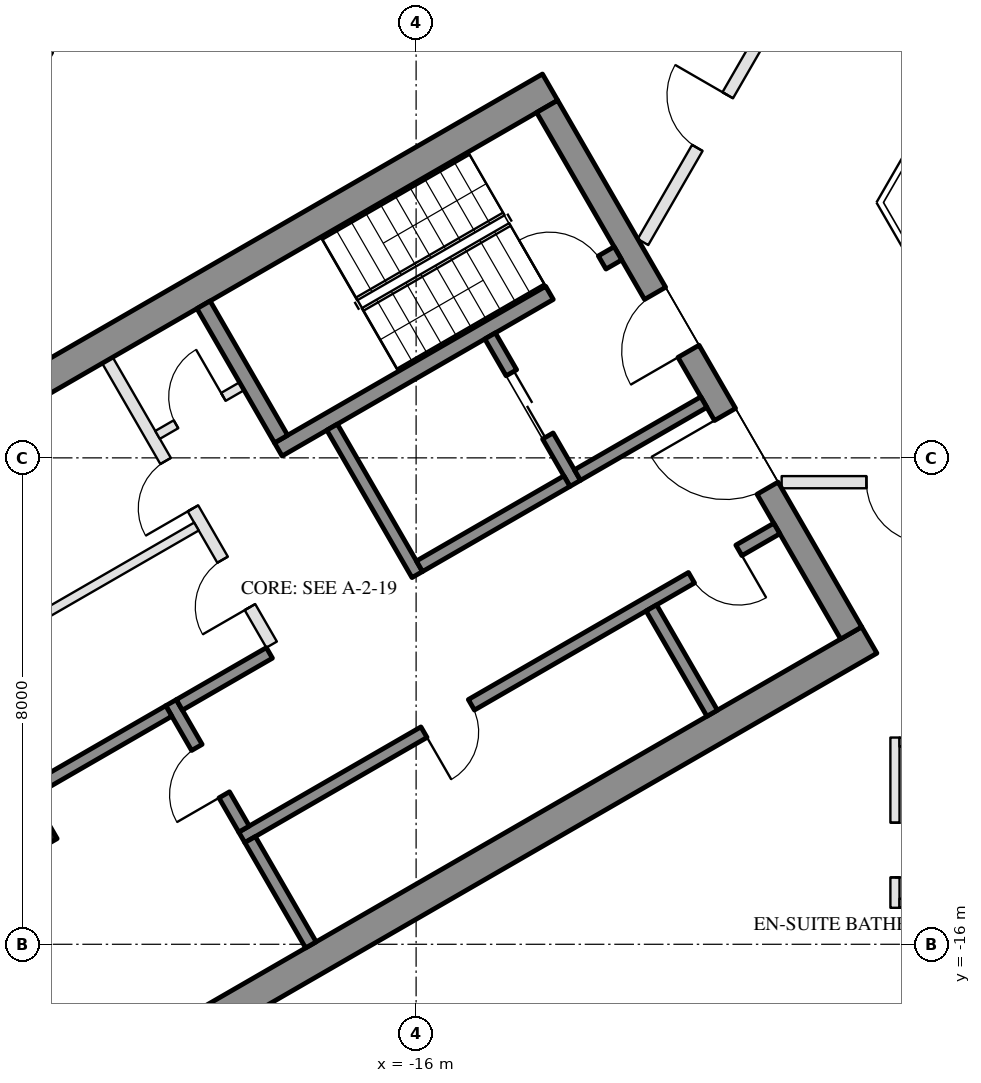
"""IFC4 building model, lengths in metres.
Left out: names, types, materials, properties, quantities, classifications, styles, units other than length and angle.
Written with IfcOpenShell. Run it as: python <this file> out.ifc"""

import sys

from ifc_helpers import new_model, si_unit, direction, frame, frame_2d, origin, origin_2d, place, context, subcontext, project, spatial, rectangle, hollow_rectangle, extrude, element, fill, save


model = new_model("IFC4")
c1 = context("Model", 3, precision=1e-05, world=origin(), true_north=direction((0.0, 1.0)))
c2 = subcontext(c1, "Body", "Model", "MODEL_VIEW")
j1 = project(units=[si_unit("LENGTHUNIT", "METRE"), si_unit("PLANEANGLEUNIT", "RADIAN")], contexts=[c1])
p1 = place(None, origin())
s1 = spatial("IfcSite", under=j1, at=p1, CompositionType="ELEMENT")
p2 = place(p1, origin())
s2 = spatial("IfcBuilding", under=s1, at=p2, CompositionType="ELEMENT")
p3 = place(p2, frame((0.0, 0.0, 90.9)))
s3 = spatial("IfcBuildingStorey", under=s2, at=p3, CompositionType="ELEMENT", Elevation=90.9)
p4 = place(p3, frame((-23.643, -13.65, 0.0), z_axis=(0.0, 0.0, 1.0), x_axis=(-0.5, 0.866025403784, 0.0)))
e1 = element("IfcColumn", 1, at=p4, inside=s3, PredefinedType="COLUMN", context=c2, shape_type="SweptSolid", body=[
    extrude(hollow_rectangle(XDim=2.8, YDim=2.4, WallThickness=0.07, at=origin_2d()), origin(), (0.0, 0.0, 1.0), 3.7),
])
p5 = place(p3, frame((-20.309, 1.934, 0.0), z_axis=(0.0, 0.0, 1.0), x_axis=(-0.499992114976, -0.866029956157, 0.0)))
e2 = element("IfcWall", 2, at=p5, inside=s3, PredefinedType="SOLIDWALL", context=c2, shape_type="SweptSolid", body=[
    extrude(rectangle(XDim=6.74, YDim=0.35, at=frame_2d((3.37, 0.0))), origin(), (0.0, 0.0, 1.0), 3.55),
])
p6 = place(p5, frame((4.02, 0.0, 0.0)))
e3 = element("IfcOpeningElement", 3, at=p6, cuts=e2, PredefinedType="OPENING", context=c2, shape_type="SweptSolid", body=[
    extrude(rectangle(XDim=2.4, YDim=2.4, at=frame_2d((1.2, 1.2))), frame((0.0, 0.185, 0.0), z_axis=(0.0, -1.0, 0.0), x_axis=(1.0, 0.0, 0.0)), (0.0, 0.0, 1.0), 0.37),
])
p7 = place(p5, frame((0.77, 0.0, 0.3)))
e4 = element("IfcOpeningElement", 4, at=p7, cuts=e2, PredefinedType="OPENING", context=c2, shape_type="SweptSolid", body=[
    extrude(rectangle(XDim=2.9, YDim=2.65, at=frame_2d((1.45, 1.325))), frame((0.0, 0.185, 0.0), z_axis=(0.0, -1.0, 0.0), x_axis=(1.0, 0.0, 0.0)), (0.0, 0.0, 1.0), 0.37),
])
for number, where, z_axis, x_axis in (
    (5, (-13.797, -1.903, 0.0), (0.0, 0.0, 1.0), (-0.866, -0.5, 0.0)),
    (6, (-8.547, -10.997, 0.0), (0.0, 0.0, 1.0), (-0.866, -0.5, 0.0)),
):
    element("IfcWall", number, at=place(p3, frame(where, z_axis=z_axis, x_axis=x_axis)), inside=s3, PredefinedType="SHEAR", context=c2, shape_type="SweptSolid", body=[
        extrude(rectangle(XDim=14.837, YDim=0.5, at=frame_2d((7.418, 0.0))), origin(), (0.0, 0.0, 1.0), 3.5),
    ])
p8 = place(p3, frame((-13.845, -2.22, 0.0), z_axis=(0.0, 0.0, 1.0), x_axis=(0.500004234368, -0.866022959057, 0.0)))
e7 = element("IfcWall", 7, at=p8, inside=s3, PredefinedType="SHEAR", context=c2, shape_type="SweptSolid", body=[
    extrude(rectangle(XDim=10.0, YDim=0.4, at=frame_2d((5.0, 0.0))), origin(), (0.0, 0.0, 1.0), 3.5),
])
p9 = place(p8, frame((3.55, 0.0, 0.0)))
e8 = element("IfcOpeningElement", 8, at=p9, cuts=e7, PredefinedType="OPENING", context=c2, shape_type="SweptSolid", body=[
    extrude(rectangle(XDim=1.1, YDim=2.1, at=frame_2d((0.55, 1.05))), frame((0.0, 0.21, 0.0), z_axis=(0.0, -1.0, 0.0), x_axis=(1.0, 0.0, 0.0)), (0.0, 0.0, 1.0), 0.42),
])
p10 = place(p8, frame((5.85, 0.0, 0.0)))
e9 = element("IfcOpeningElement", 9, at=p10, cuts=e7, PredefinedType="OPENING", context=c2, shape_type="SweptSolid", body=[
    extrude(rectangle(XDim=1.4, YDim=2.1, at=frame_2d((0.7, 1.05))), frame((0.0, 0.21, 0.0), z_axis=(0.0, -1.0, 0.0), x_axis=(1.0, 0.0, 0.0)), (0.0, 0.0, 1.0), 0.42),
])
p11 = place(p3, frame((-12.681, -4.636, 0.0), z_axis=(0.0, 0.0, 1.0), x_axis=(-0.866021702275, -0.500006411147, 0.0)))
e10 = element("IfcWall", 10, at=p11, inside=s3, PredefinedType="SHEAR", context=c2, shape_type="SweptSolid", body=[
    extrude(rectangle(XDim=6.45, YDim=0.25, at=frame_2d((3.225, 0.0))), origin(), (0.0, 0.0, 1.0), 3.5),
])
p12 = place(p11, frame((0.3, 0.0, 0.0)))
e11 = element("IfcOpeningElement", 11, at=p12, cuts=e10, PredefinedType="OPENING", context=c2, shape_type="SweptSolid", body=[
    extrude(rectangle(XDim=1.0, YDim=2.1, at=frame_2d((0.5, 1.05))), frame((0.0, 0.135, 0.0), z_axis=(0.0, -1.0, 0.0), x_axis=(1.0, 0.0, 0.0)), (0.0, 0.0, 1.0), 0.27),
])
p13 = place(p3, frame((-19.496, -5.482, 0.0), z_axis=(0.0, 0.0, 1.0), x_axis=(0.499990435942, -0.866030925526, 0.0)))
e12 = element("IfcWall", 12, at=p13, inside=s3, PredefinedType="SHEAR", context=c2, shape_type="SweptSolid", body=[
    extrude(rectangle(XDim=2.55, YDim=0.25, at=frame_2d((1.275, 0.0))), origin(), (0.0, 0.0, 1.0), 3.5),
])
p14 = place(p3, frame((-17.381, -7.495, 0.0), z_axis=(0.0, 0.0, 1.0), x_axis=(0.500011755427, -0.866018616679, 0.0)))
e13 = element("IfcWall", 13, at=p14, inside=s3, PredefinedType="SHEAR", context=c2, shape_type="SweptSolid", body=[
    extrude(rectangle(XDim=2.8, YDim=0.2, at=frame_2d((1.4, 0.0))), origin(), (0.0, 0.0, 1.0), 3.5),
])
p15 = place(p3, frame((-14.783, -5.995, 0.0), z_axis=(0.0, 0.0, 1.0), x_axis=(0.49994636267, -0.866056369097, 0.0)))
e14 = element("IfcWall", 14, at=p15, inside=s3, PredefinedType="SHEAR", context=c2, shape_type="SweptSolid", body=[
    extrude(rectangle(XDim=2.8, YDim=0.2, at=frame_2d((1.4, 0.0))), origin(), (0.0, 0.0, 1.0), 3.5),
])
p16 = place(p15, frame((0.7, 0.0, 0.0)))
e15 = element("IfcOpeningElement", 15, at=p16, cuts=e14, PredefinedType="OPENING", context=c2, shape_type="SweptSolid", body=[
    extrude(rectangle(XDim=1.2, YDim=2.1, at=frame_2d((0.6, 1.05))), frame((0.0, 0.11, 0.0), z_axis=(0.0, -1.0, 0.0), x_axis=(1.0, 0.0, 0.0)), (0.0, 0.0, 1.0), 0.22),
])
p17 = place(p3, frame((-13.52, -8.383, 0.0), z_axis=(0.0, 0.0, 1.0), x_axis=(-0.866034573852, -0.49998411664, 0.0)))
e16 = element("IfcWall", 16, at=p17, inside=s3, PredefinedType="SHEAR", context=c2, shape_type="SweptSolid", body=[
    extrude(rectangle(XDim=2.8, YDim=0.2, at=frame_2d((1.4, 0.0))), origin(), (0.0, 0.0, 1.0), 3.5),
])
p18 = place(p3, frame((-11.268, -7.083, 0.0), z_axis=(0.0, 0.0, 1.0), x_axis=(-0.866050077142, -0.499957262057, 0.0)))
e17 = element("IfcWall", 17, at=p18, inside=s3, PredefinedType="SHEAR", context=c2, shape_type="SweptSolid", body=[
    extrude(rectangle(XDim=2.4, YDim=0.2, at=frame_2d((1.2, 0.0))), origin(), (0.0, 0.0, 1.0), 3.5),
])
p19 = place(p3, frame((-10.068, -9.162, 0.0), z_axis=(0.0, 0.0, 1.0), x_axis=(-0.866032725843, -0.499987317609, 0.0)))
e18 = element("IfcWall", 18, at=p19, inside=s3, PredefinedType="SHEAR", context=c2, shape_type="SweptSolid", body=[
    extrude(rectangle(XDim=10.16, YDim=0.2, at=frame_2d((5.08, 0.0))), origin(), (0.0, 0.0, 1.0), 3.5),
])
p20 = place(p19, frame((0.72, 0.0, 0.0)))
e19 = element("IfcOpeningElement", 19, at=p20, cuts=e18, PredefinedType="OPENING", context=c2, shape_type="SweptSolid", body=[
    extrude(rectangle(XDim=0.9, YDim=2.1, at=frame_2d((0.45, 1.05))), frame((0.0, 0.11, 0.0), z_axis=(0.0, -1.0, 0.0), x_axis=(1.0, 0.0, 0.0)), (0.0, 0.0, 1.0), 0.22),
])
p21 = place(p19, frame((5.8, 0.0, 0.0)))
e20 = element("IfcOpeningElement", 20, at=p21, cuts=e18, PredefinedType="OPENING", context=c2, shape_type="SweptSolid", body=[
    extrude(rectangle(XDim=0.9, YDim=2.1, at=frame_2d((0.45, 1.05))), frame((0.0, 0.11, 0.0), z_axis=(0.0, -1.0, 0.0), x_axis=(1.0, 0.0, 0.0)), (0.0, 0.0, 1.0), 0.22),
])
p22 = place(p3, frame((-20.031, -12.026, 0.0), z_axis=(0.0, 0.0, 1.0), x_axis=(0.500033551112, -0.866006032174, 0.0)))
e21 = element("IfcWall", 21, at=p22, inside=s3, PredefinedType="SHEAR", context=c2, shape_type="SweptSolid", body=[
    extrude(rectangle(XDim=2.4, YDim=0.2, at=frame_2d((1.2, 0.0))), origin(), (0.0, 0.0, 1.0), 3.5),
])
p23 = place(p22, frame((0.85, 0.0, 0.0)))
e22 = element("IfcOpeningElement", 22, at=p23, cuts=e21, PredefinedType="OPENING", context=c2, shape_type="SweptSolid", body=[
    extrude(rectangle(XDim=0.9, YDim=2.1, at=frame_2d((0.45, 1.05))), frame((0.0, 0.11, 0.0), z_axis=(0.0, -1.0, 0.0), x_axis=(1.0, 0.0, 0.0)), (0.0, 0.0, 1.0), 0.22),
])
p24 = place(p3, frame((-18.413, -11.208, 0.0), z_axis=(0.0, 0.0, 1.0), x_axis=(-0.866038183914, -0.499977863513, 0.0)))
e23 = element("IfcWall", 23, at=p24, inside=s3, PredefinedType="SHEAR", context=c2, shape_type="SweptSolid", body=[
    extrude(rectangle(XDim=1.71, YDim=0.2, at=frame_2d((0.855, 0.0))), origin(), (0.0, 0.0, 1.0), 3.5),
])
for number, where, z_axis, x_axis in (
    (24, (-12.131, -10.468, 0.0), (0.0, 0.0, 1.0), (0.5, -0.866, 0.0)),
    (25, (-18.73, -14.278, 0.0), (0.0, 0.0, 1.0), (0.5, -0.866, 0.0)),
):
    element("IfcWall", number, at=place(p3, frame(where, z_axis=z_axis, x_axis=x_axis)), inside=s3, PredefinedType="SHEAR", context=c2, shape_type="SweptSolid", body=[
        extrude(rectangle(XDim=2.0, YDim=0.2, at=frame_2d((1.0, 0.0))), origin(), (0.0, 0.0, 1.0), 3.5),
    ])
p25 = place(p3, frame((-20.067, -12.163, 0.0), z_axis=(0.0, 0.0, 1.0), x_axis=(-0.866060851709, -0.499938597367, 0.0)))
e26 = element("IfcWall", 26, at=p25, inside=s3, PredefinedType="SHEAR", context=c2, shape_type="SweptSolid", body=[
    extrude(rectangle(XDim=2.64, YDim=0.2, at=frame_2d((1.32, 0.0))), origin(), (0.0, 0.0, 1.0), 3.5),
])
p26 = place(p3, frame((-21.076, -6.395, 0.0), z_axis=(0.0, 0.0, 1.0), x_axis=(0.50001468107, -0.866016927499, 0.0)))
e27 = element("IfcWall", 27, at=p26, inside=s3, PredefinedType="PARTITIONING", context=c2, shape_type="SweptSolid", body=[
    extrude(rectangle(XDim=5.4, YDim=0.2, at=frame_2d((2.7, 0.0))), origin(), (0.0, 0.0, 1.0), 3.5),
])
p27 = place(p26, frame((1.913, 0.0, 0.0)))
e28 = element("IfcOpeningElement", 28, at=p27, cuts=e27, PredefinedType="OPENING", context=c2, shape_type="SweptSolid", body=[
    extrude(rectangle(XDim=0.9, YDim=2.1, at=frame_2d((0.45, 1.05))), frame((0.0, 0.11, 0.0), z_axis=(0.0, -1.0, 0.0), x_axis=(1.0, 0.0, 0.0)), (0.0, 0.0, 1.0), 0.22),
])
p28 = place(p26, frame((3.788, 0.0, 0.0)))
e29 = element("IfcOpeningElement", 29, at=p28, cuts=e27, PredefinedType="OPENING", context=c2, shape_type="SweptSolid", body=[
    extrude(rectangle(XDim=0.9, YDim=2.1, at=frame_2d((0.45, 1.05))), frame((0.0, 0.11, 0.0), z_axis=(0.0, -1.0, 0.0), x_axis=(1.0, 0.0, 0.0)), (0.0, 0.0, 1.0), 0.22),
])
p29 = place(p3, frame((-18.866, -6.822, 0.0), z_axis=(0.0, 0.0, 1.0), x_axis=(-0.866028054938, -0.499995408039, 0.0)))
e30 = element("IfcWall", 30, at=p29, inside=s3, PredefinedType="PARTITIONING", context=c2, shape_type="SweptSolid", body=[
    extrude(rectangle(XDim=1.6, YDim=0.15, at=frame_2d((0.8, 0.0))), origin(), (0.0, 0.0, 1.0), 3.5),
])
p30 = place(p29, frame((0.35, 0.0, 0.0)))
e31 = element("IfcOpeningElement", 31, at=p30, cuts=e30, PredefinedType="OPENING", context=c2, shape_type="SweptSolid", body=[
    extrude(rectangle(XDim=0.9, YDim=2.1, at=frame_2d((0.45, 1.05))), frame((0.0, 0.085, 0.0), z_axis=(0.0, -1.0, 0.0), x_axis=(1.0, 0.0, 0.0)), (0.0, 0.0, 1.0), 0.17),
])
p31 = place(p3, frame((-19.613, -9.13, 0.0), z_axis=(0.0, 0.0, 1.0), x_axis=(-0.866031734426, -0.499989034847, 0.0)))
e32 = element("IfcWall", 32, at=p31, inside=s3, PredefinedType="PARTITIONING", context=c2, shape_type="SweptSolid", body=[
    extrude(rectangle(XDim=6.95, YDim=0.15, at=frame_2d((3.475, 0.0))), origin(), (0.0, 0.0, 1.0), 3.5),
])
p32 = place(p3, frame((-6.2, -8.4, 0.0), z_axis=(0.0, 0.0, 1.0), x_axis=(-1.0, 0.0, 0.0)))
e33 = element("IfcWall", 33, at=p32, inside=s3, PredefinedType="PARTITIONING", context=c2, shape_type="SweptSolid", body=[
    extrude(rectangle(XDim=3.788, YDim=0.2, at=frame_2d((1.894, 0.0))), origin(), (0.0, 0.0, 1.0), 2.95),
])
p33 = place(p32, frame((1.394, 0.0, 0.0)))
e34 = element("IfcOpeningElement", 34, at=p33, cuts=e33, PredefinedType="OPENING", context=c2, shape_type="SweptSolid", body=[
    extrude(rectangle(XDim=1.0, YDim=2.1, at=frame_2d((0.5, 1.05))), frame((0.0, 0.11, 0.0), z_axis=(0.0, -1.0, 0.0), x_axis=(1.0, 0.0, 0.0)), (0.0, 0.0, 1.0), 0.22),
])
p34 = place(p3, frame((-8.125, -12.6, 0.0), z_axis=(0.0, 0.0, 1.0), x_axis=(0.0, -1.0, 0.0)))
e35 = element("IfcWall", 35, at=p34, inside=s3, PredefinedType="PARTITIONING", context=c2, shape_type="SweptSolid", body=[
    extrude(rectangle(XDim=2.8, YDim=0.15, at=frame_2d((1.4, 0.0))), origin(), (0.0, 0.0, 1.0), 3.55),
])
p35 = place(p34, frame((1.4, 0.0, 0.0)))
e36 = element("IfcOpeningElement", 36, at=p35, cuts=e35, PredefinedType="OPENING", context=c2, shape_type="SweptSolid", body=[
    extrude(rectangle(XDim=0.9, YDim=2.1, at=frame_2d((0.45, 1.05))), frame((0.0, 0.085, 0.0), z_axis=(0.0, -1.0, 0.0), x_axis=(1.0, 0.0, 0.0)), (0.0, 0.0, 1.0), 0.17),
])
for number, where, z_axis, x_axis in (
    (37, (-8.05, -15.325, 0.0), (0.0, 0.0, 1.0), (1.0, 0.0, 0.0)),
    (38, (-8.05, -12.675, 0.0), (0.0, 0.0, 1.0), (1.0, 0.0, 0.0)),
):
    element("IfcWall", number, at=place(p3, frame(where, z_axis=z_axis, x_axis=x_axis)), inside=s3, PredefinedType="PARTITIONING", context=c2, shape_type="SweptSolid", body=[
        extrude(rectangle(XDim=1.85, YDim=0.15, at=frame_2d((0.925, 0.0))), origin(), (0.0, 0.0, 1.0), 2.95),
    ])
p36 = place(p3, frame((-12.269, -4.45, 0.0), z_axis=(0.0, 0.0, 1.0), x_axis=(0.500030411023, 0.86600784526, 0.0)))
e39 = element("IfcWall", 39, at=p36, inside=s3, PredefinedType="PARTITIONING", context=c2, shape_type="SweptSolid", body=[
    extrude(rectangle(XDim=4.575, YDim=0.2, at=frame_2d((2.288, 0.0))), origin(), (0.0, 0.0, 1.0), 2.95),
])
p37 = place(p36, frame((1.787, 0.0, 0.0)))
e40 = element("IfcOpeningElement", 40, at=p37, cuts=e39, PredefinedType="OPENING", context=c2, shape_type="SweptSolid", body=[
    extrude(rectangle(XDim=1.0, YDim=2.1, at=frame_2d((0.5, 1.05))), frame((0.0, 0.11, 0.0), z_axis=(0.0, -1.0, 0.0), x_axis=(1.0, 0.0, 0.0)), (0.0, 0.0, 1.0), 0.22),
])
p38 = place(p16, origin())
e41 = element("IfcDoor", 41, at=p38, inside=s3, OperationType="DOUBLE_DOOR_SLIDING", PredefinedType="DOOR", context=c2, shape_type="SweptSolid", body=[
    extrude(rectangle(XDim=1.2, YDim=2.1, at=frame_2d((0.6, 1.05))), frame((0.0, 0.025, 0.0), z_axis=(0.0, -1.0, 0.0), x_axis=(1.0, 0.0, 0.0)), (0.0, 0.0, 1.0), 0.05),
])
fill(e15, e41)
p39 = place(p30, frame((0.9, 0.0, 0.0), z_axis=(0.0, 0.0, 1.0), x_axis=(-1.0, 0.0, 0.0)))
e42 = element("IfcDoor", 42, at=p39, inside=s3, OperationType="SINGLE_SWING_RIGHT", PredefinedType="DOOR", context=c2, shape_type="SweptSolid", body=[
    extrude(rectangle(XDim=0.9, YDim=2.1, at=frame_2d((0.45, 1.05))), frame((0.0, 0.025, 0.0), z_axis=(0.0, -1.0, 0.0), x_axis=(1.0, 0.0, 0.0)), (0.0, 0.0, 1.0), 0.05),
])
fill(e31, e42)
p40 = place(p20, origin())
e43 = element("IfcDoor", 43, at=p40, inside=s3, OperationType="SINGLE_SWING_LEFT", PredefinedType="DOOR", context=c2, shape_type="SweptSolid", body=[
    extrude(rectangle(XDim=0.9, YDim=2.1, at=frame_2d((0.45, 1.05))), frame((0.0, 0.025, 0.0), z_axis=(0.0, -1.0, 0.0), x_axis=(1.0, 0.0, 0.0)), (0.0, 0.0, 1.0), 0.05),
])
fill(e19, e43)
p41 = place(p21, origin())
e44 = element("IfcDoor", 44, at=p41, inside=s3, OperationType="SINGLE_SWING_RIGHT", PredefinedType="DOOR", context=c2, shape_type="SweptSolid", body=[
    extrude(rectangle(XDim=0.9, YDim=2.1, at=frame_2d((0.45, 1.05))), frame((0.0, 0.025, 0.0), z_axis=(0.0, -1.0, 0.0), x_axis=(1.0, 0.0, 0.0)), (0.0, 0.0, 1.0), 0.05),
])
fill(e20, e44)
p42 = place(p23, frame((0.9, 0.0, 0.0), z_axis=(0.0, 0.0, 1.0), x_axis=(-1.0, 0.0, 0.0)))
e45 = element("IfcDoor", 45, at=p42, inside=s3, OperationType="SINGLE_SWING_LEFT", PredefinedType="DOOR", context=c2, shape_type="SweptSolid", body=[
    extrude(rectangle(XDim=0.9, YDim=2.1, at=frame_2d((0.45, 1.05))), frame((0.0, 0.025, 0.0), z_axis=(0.0, -1.0, 0.0), x_axis=(1.0, 0.0, 0.0)), (0.0, 0.0, 1.0), 0.05),
])
fill(e22, e45)
p43 = place(p27, frame((0.9, 0.0, 0.0), z_axis=(0.0, 0.0, 1.0), x_axis=(-1.0, 0.0, 0.0)))
e46 = element("IfcDoor", 46, at=p43, inside=s3, OperationType="SINGLE_SWING_LEFT", PredefinedType="DOOR", context=c2, shape_type="SweptSolid", body=[
    extrude(rectangle(XDim=0.9, YDim=2.1, at=frame_2d((0.45, 1.05))), frame((0.0, 0.025, 0.0), z_axis=(0.0, -1.0, 0.0), x_axis=(1.0, 0.0, 0.0)), (0.0, 0.0, 1.0), 0.05),
])
fill(e28, e46)
p44 = place(p28, frame((0.9, 0.0, 0.0), z_axis=(0.0, 0.0, 1.0), x_axis=(-1.0, 0.0, 0.0)))
e47 = element("IfcDoor", 47, at=p44, inside=s3, OperationType="SINGLE_SWING_LEFT", PredefinedType="DOOR", context=c2, shape_type="SweptSolid", body=[
    extrude(rectangle(XDim=0.9, YDim=2.1, at=frame_2d((0.45, 1.05))), frame((0.0, 0.025, 0.0), z_axis=(0.0, -1.0, 0.0), x_axis=(1.0, 0.0, 0.0)), (0.0, 0.0, 1.0), 0.05),
])
fill(e29, e47)
p45 = place(p9, frame((1.1, 0.0, 0.0), z_axis=(0.0, 0.0, 1.0), x_axis=(-1.0, 0.0, 0.0)))
e48 = element("IfcDoor", 48, at=p45, inside=s3, OperationType="SINGLE_SWING_LEFT", PredefinedType="DOOR", context=c2, shape_type="SweptSolid", body=[
    extrude(rectangle(XDim=1.1, YDim=2.1, at=frame_2d((0.55, 1.05))), frame((0.0, 0.025, 0.0), z_axis=(0.0, -1.0, 0.0), x_axis=(1.0, 0.0, 0.0)), (0.0, 0.0, 1.0), 0.05),
])
fill(e8, e48)
p46 = place(p10, frame((1.4, 0.0, 0.0), z_axis=(0.0, 0.0, 1.0), x_axis=(-1.0, 0.0, 0.0)))
e49 = element("IfcDoor", 49, at=p46, inside=s3, OperationType="DOUBLE_DOOR_SINGLE_SWING", PredefinedType="DOOR", context=c2, shape_type="SweptSolid", body=[
    extrude(rectangle(XDim=1.4, YDim=2.1, at=frame_2d((0.7, 1.05))), frame((0.0, 0.025, 0.0), z_axis=(0.0, -1.0, 0.0), x_axis=(1.0, 0.0, 0.0)), (0.0, 0.0, 1.0), 0.05),
])
fill(e9, e49)
p47 = place(p12, frame((1.0, 0.0, 0.0), z_axis=(0.0, 0.0, 1.0), x_axis=(-1.0, 0.0, 0.0)))
e50 = element("IfcDoor", 50, at=p47, inside=s3, OperationType="SINGLE_SWING_LEFT", PredefinedType="DOOR", context=c2, shape_type="SweptSolid", body=[
    extrude(rectangle(XDim=1.0, YDim=2.1, at=frame_2d((0.5, 1.05))), frame((0.0, 0.025, 0.0), z_axis=(0.0, -1.0, 0.0), x_axis=(1.0, 0.0, 0.0)), (0.0, 0.0, 1.0), 0.05),
])
fill(e11, e50)
p48 = place(p35, origin())
e51 = element("IfcDoor", 51, at=p48, inside=s3, OperationType="SINGLE_SWING_RIGHT", PredefinedType="DOOR", context=c2, shape_type="SweptSolid", body=[
    extrude(rectangle(XDim=0.9, YDim=2.1, at=frame_2d((0.45, 1.05))), frame((0.0, 0.025, 0.0), z_axis=(0.0, -1.0, 0.0), x_axis=(1.0, 0.0, 0.0)), (0.0, 0.0, 1.0), 0.05),
])
fill(e36, e51)
p49 = place(p33, origin())
e52 = element("IfcDoor", 52, at=p49, inside=s3, OperationType="SINGLE_SWING_LEFT", PredefinedType="DOOR", context=c2, shape_type="SweptSolid", body=[
    extrude(rectangle(XDim=1.0, YDim=2.1, at=frame_2d((0.5, 1.05))), frame((0.0, 0.025, 0.0), z_axis=(0.0, -1.0, 0.0), x_axis=(1.0, 0.0, 0.0)), (0.0, 0.0, 1.0), 0.05),
])
fill(e34, e52)
p50 = place(p37, origin())
e53 = element("IfcDoor", 53, at=p50, inside=s3, OperationType="SINGLE_SWING_RIGHT", PredefinedType="DOOR", context=c2, shape_type="SweptSolid", body=[
    extrude(rectangle(XDim=1.0, YDim=2.1, at=frame_2d((0.5, 1.05))), frame((0.0, 0.025, 0.0), z_axis=(0.0, -1.0, 0.0), x_axis=(1.0, 0.0, 0.0)), (0.0, 0.0, 1.0), 0.05),
])
fill(e40, e53)
save(model, sys.argv[1])
